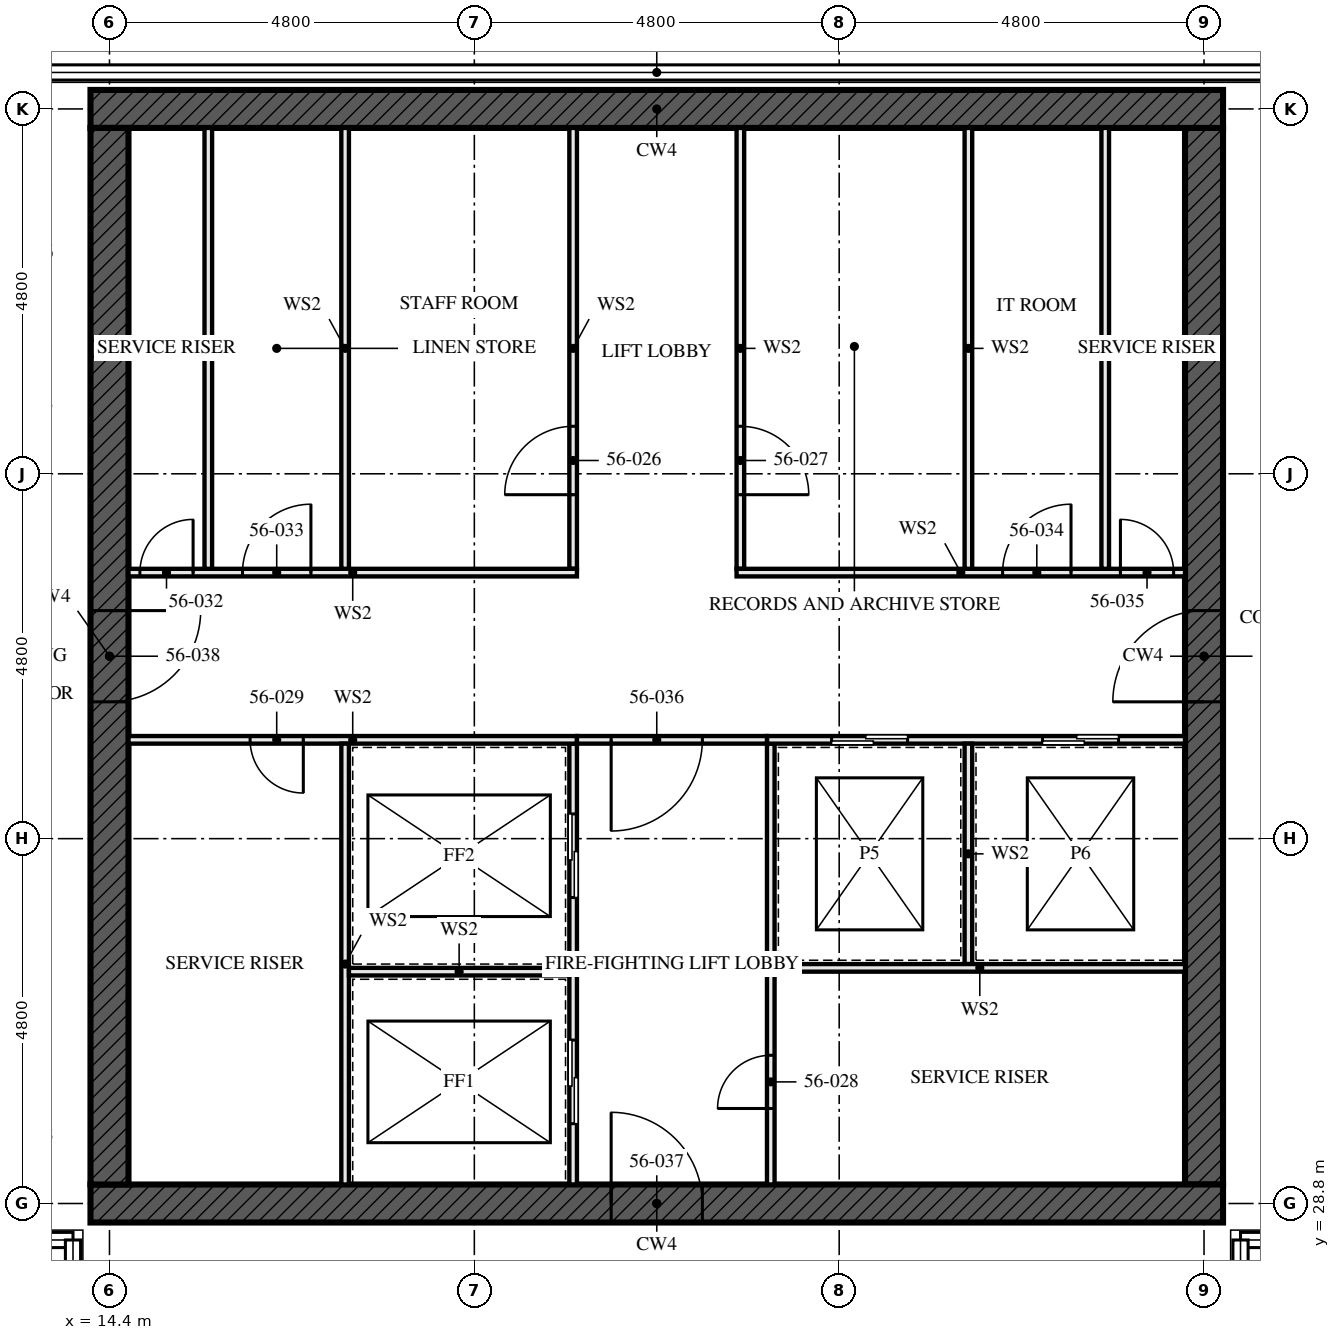
"""IFC4 building model, lengths in metres.
Left out: names, types, materials, properties, quantities, classifications, styles, units other than length and angle.
Written with IfcOpenShell. Run it as: python <this file> out.ifc"""

import sys

from ifc_helpers import new_model, si_unit, direction, frame, frame_2d, origin, place, context, subcontext, project, spatial, rectangle, extrude, element, fill, save


model = new_model("IFC4")
c1 = context("Model", 3, precision=1e-05, world=origin(), true_north=direction((0.0, 1.0)))
c2 = subcontext(c1, "Body", "Model", "MODEL_VIEW")
j1 = project(units=[si_unit("LENGTHUNIT", "METRE"), si_unit("PLANEANGLEUNIT", "RADIAN")], contexts=[c1])
p1 = place(None, origin())
s1 = spatial("IfcSite", under=j1, at=p1, CompositionType="ELEMENT")
p2 = place(p1, origin())
s2 = spatial("IfcBuilding", under=s1, at=p2, CompositionType="ELEMENT")
p3 = place(p2, frame((0.0, 0.0, 205.0)))
s3 = spatial("IfcBuildingStorey", under=s2, at=p3, CompositionType="ELEMENT", Elevation=205.0)
p4 = place(p3, frame((14.15, 28.8, -0.17), z_axis=(0.0, 0.0, 1.0), x_axis=(1.0, 0.0, 0.0)))
e1 = element("IfcWall", 1, at=p4, inside=s3, PredefinedType="SHEAR", context=c2, shape_type="SweptSolid", body=[
    extrude(rectangle(XDim=14.9, YDim=0.5, at=frame_2d((7.45, 0.0))), origin(), (0.0, 0.0, 1.0), 3.5),
])
p5 = place(p4, frame((6.85, 0.0, 0.17)))
e2 = element("IfcOpeningElement", 2, at=p5, cuts=e1, PredefinedType="OPENING", context=c2, shape_type="SweptSolid", body=[
    extrude(rectangle(XDim=1.2, YDim=2.1, at=frame_2d((0.6, 1.05))), frame((0.0, 0.26, 0.0), z_axis=(0.0, -1.0, 0.0), x_axis=(1.0, 0.0, 0.0)), (0.0, 0.0, 1.0), 0.521),
])
p6 = place(p3, frame((29.05, 43.2, -0.17), z_axis=(0.0, 0.0, 1.0), x_axis=(-1.0, 0.0, 0.0)))
e3 = element("IfcWall", 3, at=p6, inside=s3, PredefinedType="SHEAR", context=c2, shape_type="SweptSolid", body=[
    extrude(rectangle(XDim=14.9, YDim=0.5, at=frame_2d((7.45, 0.0))), origin(), (0.0, 0.0, 1.0), 3.5),
])
p7 = place(p3, frame((14.4, 42.95, -0.17), z_axis=(0.0, 0.0, 1.0), x_axis=(0.0, -1.0, 0.0)))
e4 = element("IfcWall", 4, at=p7, inside=s3, PredefinedType="SHEAR", context=c2, shape_type="SweptSolid", body=[
    extrude(rectangle(XDim=13.9, YDim=0.5, at=frame_2d((6.95, 0.0))), origin(), (0.0, 0.0, 1.0), 3.5),
])
p8 = place(p7, frame((6.35, 0.0, 0.17)))
e5 = element("IfcOpeningElement", 5, at=p8, cuts=e4, PredefinedType="OPENING", context=c2, shape_type="SweptSolid", body=[
    extrude(rectangle(XDim=1.2, YDim=2.1, at=frame_2d((0.6, 1.05))), frame((0.0, 0.26, 0.0), z_axis=(0.0, -1.0, 0.0), x_axis=(1.0, 0.0, 0.0)), (0.0, 0.0, 1.0), 0.521),
])
p9 = place(p3, frame((28.8, 29.05, -0.17), z_axis=(0.0, 0.0, 1.0), x_axis=(0.0, 1.0, 0.0)))
e6 = element("IfcWall", 6, at=p9, inside=s3, PredefinedType="SHEAR", context=c2, shape_type="SweptSolid", body=[
    extrude(rectangle(XDim=13.9, YDim=0.5, at=frame_2d((6.95, 0.0))), origin(), (0.0, 0.0, 1.0), 3.5),
])
p10 = place(p9, frame((6.35, 0.0, 0.17)))
e7 = element("IfcOpeningElement", 7, at=p10, cuts=e6, PredefinedType="OPENING", context=c2, shape_type="SweptSolid", body=[
    extrude(rectangle(XDim=1.2, YDim=2.1, at=frame_2d((0.6, 1.05))), frame((0.0, 0.26, 0.0), z_axis=(0.0, -1.0, 0.0), x_axis=(1.0, 0.0, 0.0)), (0.0, 0.0, 1.0), 0.521),
])
for number, where, z_axis, x_axis in (
    (8, (15.7, 37.15, 0.0), (0.0, 0.0, 1.0), (0.0, 1.0, 0.0)),
    (9, (27.5, 37.15, 0.0), (0.0, 0.0, 1.0), (0.0, 1.0, 0.0)),
):
    element("IfcWall", number, at=place(p3, frame(where, z_axis=z_axis, x_axis=x_axis)), inside=s3, PredefinedType="SOLIDWALL", context=c2, shape_type="SweptSolid", body=[
        extrude(rectangle(XDim=5.8, YDim=0.1, at=frame_2d((2.9, 0.0))), origin(), (0.0, 0.0, 1.0), 3.33),
    ])
p11 = place(p3, frame((20.5, 29.05, 0.0), z_axis=(0.0, 0.0, 1.0), x_axis=(0.0, 1.0, 0.0)))
e10 = element("IfcWall", 10, at=p11, inside=s3, PredefinedType="SOLIDWALL", context=c2, shape_type="SweptSolid", body=[
    extrude(rectangle(XDim=5.8, YDim=0.1, at=frame_2d((2.9, 0.0))), origin(), (0.0, 0.0, 1.0), 3.33),
])
p12 = place(p11, frame((0.8, 0.0, 0.0)))
e11 = element("IfcOpeningElement", 11, at=p12, cuts=e10, PredefinedType="OPENING", context=c2, shape_type="SweptSolid", body=[
    extrude(rectangle(XDim=1.1, YDim=2.3, at=frame_2d((0.55, 1.15))), frame((0.0, 0.061, 0.0), z_axis=(0.0, -1.0, 0.0), x_axis=(1.0, 0.0, 0.0)), (0.0, 0.0, 1.0), 0.121),
])
p13 = place(p11, frame((3.775, 0.0, 0.0)))
e12 = element("IfcOpeningElement", 12, at=p13, cuts=e10, PredefinedType="OPENING", context=c2, shape_type="SweptSolid", body=[
    extrude(rectangle(XDim=1.1, YDim=2.3, at=frame_2d((0.55, 1.15))), frame((0.0, 0.061, 0.0), z_axis=(0.0, -1.0, 0.0), x_axis=(1.0, 0.0, 0.0)), (0.0, 0.0, 1.0), 0.121),
])
p14 = place(p3, frame((20.5, 37.15, 0.0), z_axis=(0.0, 0.0, 1.0), x_axis=(0.0, 1.0, 0.0)))
e13 = element("IfcWall", 13, at=p14, inside=s3, PredefinedType="SOLIDWALL", context=c2, shape_type="SweptSolid", body=[
    extrude(rectangle(XDim=5.8, YDim=0.1, at=frame_2d((2.9, 0.0))), origin(), (0.0, 0.0, 1.0), 3.33),
])
p15 = place(p14, frame((0.975, 0.0, 0.0)))
e14 = element("IfcOpeningElement", 14, at=p15, cuts=e13, PredefinedType="OPENING", context=c2, shape_type="SweptSolid", body=[
    extrude(rectangle(XDim=0.9, YDim=2.1, at=frame_2d((0.45, 1.05))), frame((0.0, 0.061, 0.0), z_axis=(0.0, -1.0, 0.0), x_axis=(1.0, 0.0, 0.0)), (0.0, 0.0, 1.0), 0.121),
])
p16 = place(p3, frame((22.7, 37.15, 0.0), z_axis=(0.0, 0.0, 1.0), x_axis=(0.0, 1.0, 0.0)))
e15 = element("IfcWall", 15, at=p16, inside=s3, PredefinedType="SOLIDWALL", context=c2, shape_type="SweptSolid", body=[
    extrude(rectangle(XDim=5.8, YDim=0.1, at=frame_2d((2.9, 0.0))), origin(), (0.0, 0.0, 1.0), 3.33),
])
p17 = place(p16, frame((0.975, 0.0, 0.0)))
e16 = element("IfcOpeningElement", 16, at=p17, cuts=e15, PredefinedType="OPENING", context=c2, shape_type="SweptSolid", body=[
    extrude(rectangle(XDim=0.9, YDim=2.1, at=frame_2d((0.45, 1.05))), frame((0.0, 0.061, 0.0), z_axis=(0.0, -1.0, 0.0), x_axis=(1.0, 0.0, 0.0)), (0.0, 0.0, 1.0), 0.121),
])
p18 = place(p3, frame((23.1, 29.05, 0.0), z_axis=(0.0, 0.0, 1.0), x_axis=(0.0, 1.0, 0.0)))
e17 = element("IfcWall", 17, at=p18, inside=s3, PredefinedType="SOLIDWALL", context=c2, shape_type="SweptSolid", body=[
    extrude(rectangle(XDim=5.8, YDim=0.1, at=frame_2d((2.9, 0.0))), origin(), (0.0, 0.0, 1.0), 3.33),
])
p19 = place(p18, frame((1.0, 0.0, 0.0)))
e18 = element("IfcOpeningElement", 18, at=p19, cuts=e17, PredefinedType="OPENING", context=c2, shape_type="SweptSolid", body=[
    extrude(rectangle(XDim=0.7, YDim=2.1, at=frame_2d((0.35, 1.05))), frame((0.0, 0.061, 0.0), z_axis=(0.0, -1.0, 0.0), x_axis=(1.0, 0.0, 0.0)), (0.0, 0.0, 1.0), 0.121),
])
p20 = place(p3, frame((14.65, 34.9, 0.0), z_axis=(0.0, 0.0, 1.0), x_axis=(1.0, 0.0, 0.0)))
e19 = element("IfcWall", 19, at=p20, inside=s3, PredefinedType="SOLIDWALL", context=c2, shape_type="SweptSolid", body=[
    extrude(rectangle(XDim=5.9, YDim=0.1, at=frame_2d((2.95, 0.0))), origin(), (0.0, 0.0, 1.0), 3.33),
])
p21 = place(p20, frame((1.6, 0.0, 0.0)))
e20 = element("IfcOpeningElement", 20, at=p21, cuts=e19, PredefinedType="OPENING", context=c2, shape_type="SweptSolid", body=[
    extrude(rectangle(XDim=0.7, YDim=2.1, at=frame_2d((0.35, 1.05))), frame((0.0, 0.061, 0.0), z_axis=(0.0, -1.0, 0.0), x_axis=(1.0, 0.0, 0.0)), (0.0, 0.0, 1.0), 0.121),
])
p22 = place(p3, frame((23.05, 34.9, 0.0), z_axis=(0.0, 0.0, 1.0), x_axis=(1.0, 0.0, 0.0)))
e21 = element("IfcWall", 21, at=p22, inside=s3, PredefinedType="SOLIDWALL", context=c2, shape_type="SweptSolid", body=[
    extrude(rectangle(XDim=5.5, YDim=0.1, at=frame_2d((2.75, 0.0))), origin(), (0.0, 0.0, 1.0), 3.33),
])
p23 = place(p22, frame((0.85, 0.0, 0.0)))
e22 = element("IfcOpeningElement", 22, at=p23, cuts=e21, PredefinedType="OPENING", context=c2, shape_type="SweptSolid", body=[
    extrude(rectangle(XDim=1.0, YDim=2.1, at=frame_2d((0.5, 1.05))), frame((0.0, 0.061, 0.0), z_axis=(0.0, -1.0, 0.0), x_axis=(1.0, 0.0, 0.0)), (0.0, 0.0, 1.0), 0.121),
])
p24 = place(p22, frame((3.625, 0.0, 0.0)))
e23 = element("IfcOpeningElement", 23, at=p24, cuts=e21, PredefinedType="OPENING", context=c2, shape_type="SweptSolid", body=[
    extrude(rectangle(XDim=1.0, YDim=2.1, at=frame_2d((0.5, 1.05))), frame((0.0, 0.061, 0.0), z_axis=(0.0, -1.0, 0.0), x_axis=(1.0, 0.0, 0.0)), (0.0, 0.0, 1.0), 0.121),
])
p25 = place(p3, frame((14.65, 37.1, 0.0), z_axis=(0.0, 0.0, 1.0), x_axis=(1.0, 0.0, 0.0)))
e24 = element("IfcWall", 24, at=p25, inside=s3, PredefinedType="SOLIDWALL", context=c2, shape_type="SweptSolid", body=[
    extrude(rectangle(XDim=5.9, YDim=0.1, at=frame_2d((2.95, 0.0))), origin(), (0.0, 0.0, 1.0), 3.33),
])
p26 = place(p25, frame((0.15, 0.0, 0.0)))
e25 = element("IfcOpeningElement", 25, at=p26, cuts=e24, PredefinedType="OPENING", context=c2, shape_type="SweptSolid", body=[
    extrude(rectangle(XDim=0.7, YDim=2.1, at=frame_2d((0.35, 1.05))), frame((0.0, 0.061, 0.0), z_axis=(0.0, -1.0, 0.0), x_axis=(1.0, 0.0, 0.0)), (0.0, 0.0, 1.0), 0.121),
])
p27 = place(p25, frame((1.5, 0.0, 0.0)))
e26 = element("IfcOpeningElement", 26, at=p27, cuts=e24, PredefinedType="OPENING", context=c2, shape_type="SweptSolid", body=[
    extrude(rectangle(XDim=0.9, YDim=2.1, at=frame_2d((0.45, 1.05))), frame((0.0, 0.061, 0.0), z_axis=(0.0, -1.0, 0.0), x_axis=(1.0, 0.0, 0.0)), (0.0, 0.0, 1.0), 0.121),
])
p28 = place(p3, frame((22.65, 37.1, 0.0), z_axis=(0.0, 0.0, 1.0), x_axis=(1.0, 0.0, 0.0)))
e27 = element("IfcWall", 27, at=p28, inside=s3, PredefinedType="SOLIDWALL", context=c2, shape_type="SweptSolid", body=[
    extrude(rectangle(XDim=5.9, YDim=0.1, at=frame_2d((2.95, 0.0))), origin(), (0.0, 0.0, 1.0), 3.33),
])
p29 = place(p28, frame((3.5, 0.0, 0.0)))
e28 = element("IfcOpeningElement", 28, at=p29, cuts=e27, PredefinedType="OPENING", context=c2, shape_type="SweptSolid", body=[
    extrude(rectangle(XDim=0.9, YDim=2.1, at=frame_2d((0.45, 1.05))), frame((0.0, 0.061, 0.0), z_axis=(0.0, -1.0, 0.0), x_axis=(1.0, 0.0, 0.0)), (0.0, 0.0, 1.0), 0.121),
])
p30 = place(p28, frame((5.05, 0.0, 0.0)))
e29 = element("IfcOpeningElement", 29, at=p30, cuts=e27, PredefinedType="OPENING", context=c2, shape_type="SweptSolid", body=[
    extrude(rectangle(XDim=0.7, YDim=2.1, at=frame_2d((0.35, 1.05))), frame((0.0, 0.061, 0.0), z_axis=(0.0, -1.0, 0.0), x_axis=(1.0, 0.0, 0.0)), (0.0, 0.0, 1.0), 0.121),
])
p31 = place(p3, frame((20.55, 34.9, 0.0), z_axis=(0.0, 0.0, 1.0), x_axis=(1.0, 0.0, 0.0)))
e30 = element("IfcWall", 30, at=p31, inside=s3, PredefinedType="SOLIDWALL", context=c2, shape_type="SweptSolid", body=[
    extrude(rectangle(XDim=2.5, YDim=0.1, at=frame_2d((1.25, 0.0))), origin(), (0.0, 0.0, 1.0), 3.33),
])
p32 = place(p31, frame((0.45, 0.0, 0.0)))
e31 = element("IfcOpeningElement", 31, at=p32, cuts=e30, PredefinedType="OPENING", context=c2, shape_type="SweptSolid", body=[
    extrude(rectangle(XDim=1.2, YDim=2.1, at=frame_2d((0.6, 1.05))), frame((0.0, 0.061, 0.0), z_axis=(0.0, -1.0, 0.0), x_axis=(1.0, 0.0, 0.0)), (0.0, 0.0, 1.0), 0.121),
])
p33 = place(p3, frame((17.5, 29.05, 0.0), z_axis=(0.0, 0.0, 1.0), x_axis=(0.0, 1.0, 0.0)))
e32 = element("IfcWall", 32, at=p33, inside=s3, PredefinedType="SOLIDWALL", context=c2, shape_type="SweptSolid", body=[
    extrude(rectangle(XDim=5.8, YDim=0.1, at=frame_2d((2.9, 0.0))), origin(), (0.0, 0.0, 1.0), 3.33),
])
p34 = place(p3, frame((17.55, 31.85, 0.0), z_axis=(0.0, 0.0, 1.0), x_axis=(1.0, 0.0, 0.0)))
e33 = element("IfcWall", 33, at=p34, inside=s3, PredefinedType="SOLIDWALL", context=c2, shape_type="SweptSolid", body=[
    extrude(rectangle(XDim=2.9, YDim=0.1, at=frame_2d((1.45, 0.0))), origin(), (0.0, 0.0, 1.0), 3.33),
])
for number, where, z_axis, x_axis in (
    (34, (17.5, 37.15, 0.0), (0.0, 0.0, 1.0), (0.0, 1.0, 0.0)),
    (35, (25.7, 37.15, 0.0), (0.0, 0.0, 1.0), (0.0, 1.0, 0.0)),
):
    element("IfcWall", number, at=place(p3, frame(where, z_axis=z_axis, x_axis=x_axis)), inside=s3, PredefinedType="SOLIDWALL", context=c2, shape_type="SweptSolid", body=[
        extrude(rectangle(XDim=5.8, YDim=0.1, at=frame_2d((2.9, 0.0))), origin(), (0.0, 0.0, 1.0), 3.33),
    ])
p35 = place(p3, frame((25.7, 31.95, 0.0), z_axis=(0.0, 0.0, 1.0), x_axis=(0.0, 1.0, 0.0)))
e36 = element("IfcWall", 36, at=p35, inside=s3, PredefinedType="SOLIDWALL", context=c2, shape_type="SweptSolid", body=[
    extrude(rectangle(XDim=2.9, YDim=0.1, at=frame_2d((1.45, 0.0))), origin(), (0.0, 0.0, 1.0), 3.33),
])
p36 = place(p3, frame((23.15, 31.9, 0.0), z_axis=(0.0, 0.0, 1.0), x_axis=(1.0, 0.0, 0.0)))
e37 = element("IfcWall", 37, at=p36, inside=s3, PredefinedType="SOLIDWALL", context=c2, shape_type="SweptSolid", body=[
    extrude(rectangle(XDim=5.4, YDim=0.1, at=frame_2d((2.7, 0.0))), origin(), (0.0, 0.0, 1.0), 3.33),
])
p37 = place(p12, origin())
e38 = element("IfcDoor", 38, at=p37, inside=s3, OperationType="SLIDING_TO_LEFT", PredefinedType="DOOR", context=c2, shape_type="SweptSolid", body=[
    extrude(rectangle(XDim=1.1, YDim=2.3, at=frame_2d((0.55, 1.15))), frame((0.0, 0.05, 0.0), z_axis=(0.0, -1.0, 0.0), x_axis=(1.0, 0.0, 0.0)), (0.0, 0.0, 1.0), 0.1),
])
fill(e11, e38)
p38 = place(p13, origin())
e39 = element("IfcDoor", 39, at=p38, inside=s3, OperationType="SLIDING_TO_LEFT", PredefinedType="DOOR", context=c2, shape_type="SweptSolid", body=[
    extrude(rectangle(XDim=1.1, YDim=2.3, at=frame_2d((0.55, 1.15))), frame((0.0, 0.05, 0.0), z_axis=(0.0, -1.0, 0.0), x_axis=(1.0, 0.0, 0.0)), (0.0, 0.0, 1.0), 0.1),
])
fill(e12, e39)
p39 = place(p15, origin())
e40 = element("IfcDoor", 40, at=p39, inside=s3, OperationType="SINGLE_SWING_RIGHT", PredefinedType="DOOR", context=c2, shape_type="SweptSolid", body=[
    extrude(rectangle(XDim=0.9, YDim=2.1, at=frame_2d((0.45, 1.05))), frame((0.0, 0.027, 0.0), z_axis=(0.0, -1.0, 0.0), x_axis=(1.0, 0.0, 0.0)), (0.0, 0.0, 1.0), 0.054),
])
fill(e14, e40)
p40 = place(p17, frame((0.9, 0.0, 0.0), z_axis=(0.0, 0.0, 1.0), x_axis=(-1.0, 0.0, 0.0)))
e41 = element("IfcDoor", 41, at=p40, inside=s3, OperationType="SINGLE_SWING_LEFT", PredefinedType="DOOR", context=c2, shape_type="SweptSolid", body=[
    extrude(rectangle(XDim=0.9, YDim=2.1, at=frame_2d((0.45, 1.05))), frame((0.0, 0.027, 0.0), z_axis=(0.0, -1.0, 0.0), x_axis=(1.0, 0.0, 0.0)), (0.0, 0.0, 1.0), 0.054),
])
fill(e16, e41)
p41 = place(p19, origin())
e42 = element("IfcDoor", 42, at=p41, inside=s3, OperationType="SINGLE_SWING_RIGHT", PredefinedType="DOOR", context=c2, shape_type="SweptSolid", body=[
    extrude(rectangle(XDim=0.7, YDim=2.1, at=frame_2d((0.35, 1.05))), frame((0.0, 0.027, 0.0), z_axis=(0.0, -1.0, 0.0), x_axis=(1.0, 0.0, 0.0)), (0.0, 0.0, 1.0), 0.054),
])
fill(e18, e42)
p42 = place(p21, frame((0.7, 0.0, 0.0), z_axis=(0.0, 0.0, 1.0), x_axis=(-1.0, 0.0, 0.0)))
e43 = element("IfcDoor", 43, at=p42, inside=s3, OperationType="SINGLE_SWING_RIGHT", PredefinedType="DOOR", context=c2, shape_type="SweptSolid", body=[
    extrude(rectangle(XDim=0.7, YDim=2.1, at=frame_2d((0.35, 1.05))), frame((0.0, 0.027, 0.0), z_axis=(0.0, -1.0, 0.0), x_axis=(1.0, 0.0, 0.0)), (0.0, 0.0, 1.0), 0.054),
])
fill(e20, e43)
p43 = place(p23, origin())
e44 = element("IfcDoor", 44, at=p43, inside=s3, OperationType="SLIDING_TO_LEFT", PredefinedType="DOOR", context=c2, shape_type="SweptSolid", body=[
    extrude(rectangle(XDim=1.0, YDim=2.1, at=frame_2d((0.5, 1.05))), frame((0.0, 0.05, 0.0), z_axis=(0.0, -1.0, 0.0), x_axis=(1.0, 0.0, 0.0)), (0.0, 0.0, 1.0), 0.1),
])
fill(e22, e44)
p44 = place(p24, origin())
e45 = element("IfcDoor", 45, at=p44, inside=s3, OperationType="SLIDING_TO_LEFT", PredefinedType="DOOR", context=c2, shape_type="SweptSolid", body=[
    extrude(rectangle(XDim=1.0, YDim=2.1, at=frame_2d((0.5, 1.05))), frame((0.0, 0.05, 0.0), z_axis=(0.0, -1.0, 0.0), x_axis=(1.0, 0.0, 0.0)), (0.0, 0.0, 1.0), 0.1),
])
fill(e23, e45)
p45 = place(p26, origin())
e46 = element("IfcDoor", 46, at=p45, inside=s3, OperationType="SINGLE_SWING_LEFT", PredefinedType="DOOR", context=c2, shape_type="SweptSolid", body=[
    extrude(rectangle(XDim=0.7, YDim=2.1, at=frame_2d((0.35, 1.05))), frame((0.0, 0.027, 0.0), z_axis=(0.0, -1.0, 0.0), x_axis=(1.0, 0.0, 0.0)), (0.0, 0.0, 1.0), 0.054),
])
fill(e25, e46)
p46 = place(p27, origin())
e47 = element("IfcDoor", 47, at=p46, inside=s3, OperationType="SINGLE_SWING_LEFT", PredefinedType="DOOR", context=c2, shape_type="SweptSolid", body=[
    extrude(rectangle(XDim=0.9, YDim=2.1, at=frame_2d((0.45, 1.05))), frame((0.0, 0.027, 0.0), z_axis=(0.0, -1.0, 0.0), x_axis=(1.0, 0.0, 0.0)), (0.0, 0.0, 1.0), 0.054),
])
fill(e26, e47)
p47 = place(p29, origin())
e48 = element("IfcDoor", 48, at=p47, inside=s3, OperationType="SINGLE_SWING_LEFT", PredefinedType="DOOR", context=c2, shape_type="SweptSolid", body=[
    extrude(rectangle(XDim=0.9, YDim=2.1, at=frame_2d((0.45, 1.05))), frame((0.0, 0.027, 0.0), z_axis=(0.0, -1.0, 0.0), x_axis=(1.0, 0.0, 0.0)), (0.0, 0.0, 1.0), 0.054),
])
fill(e28, e48)
p48 = place(p30, origin())
e49 = element("IfcDoor", 49, at=p48, inside=s3, OperationType="SINGLE_SWING_RIGHT", PredefinedType="DOOR", context=c2, shape_type="SweptSolid", body=[
    extrude(rectangle(XDim=0.7, YDim=2.1, at=frame_2d((0.35, 1.05))), frame((0.0, 0.027, 0.0), z_axis=(0.0, -1.0, 0.0), x_axis=(1.0, 0.0, 0.0)), (0.0, 0.0, 1.0), 0.054),
])
fill(e29, e49)
p49 = place(p32, frame((1.2, 0.0, 0.0), z_axis=(0.0, 0.0, 1.0), x_axis=(-1.0, 0.0, 0.0)))
e50 = element("IfcDoor", 50, at=p49, inside=s3, OperationType="SINGLE_SWING_LEFT", PredefinedType="DOOR", context=c2, shape_type="SweptSolid", body=[
    extrude(rectangle(XDim=1.2, YDim=2.1, at=frame_2d((0.6, 1.05))), frame((0.0, 0.027, 0.0), z_axis=(0.0, -1.0, 0.0), x_axis=(1.0, 0.0, 0.0)), (0.0, 0.0, 1.0), 0.054),
])
fill(e31, e50)
p50 = place(p5, origin())
e51 = element("IfcDoor", 51, at=p50, inside=s3, OperationType="SINGLE_SWING_LEFT", PredefinedType="DOOR", context=c2, shape_type="SweptSolid", body=[
    extrude(rectangle(XDim=1.2, YDim=2.1, at=frame_2d((0.6, 1.05))), frame((0.0, 0.027, 0.0), z_axis=(0.0, -1.0, 0.0), x_axis=(1.0, 0.0, 0.0)), (0.0, 0.0, 1.0), 0.054),
])
fill(e2, e51)
p51 = place(p8, origin())
e52 = element("IfcDoor", 52, at=p51, inside=s3, OperationType="SINGLE_SWING_LEFT", PredefinedType="DOOR", context=c2, shape_type="SweptSolid", body=[
    extrude(rectangle(XDim=1.2, YDim=2.1, at=frame_2d((0.6, 1.05))), frame((0.0, 0.027, 0.0), z_axis=(0.0, -1.0, 0.0), x_axis=(1.0, 0.0, 0.0)), (0.0, 0.0, 1.0), 0.054),
])
fill(e5, e52)
p52 = place(p10, origin())
e53 = element("IfcDoor", 53, at=p52, inside=s3, OperationType="SINGLE_SWING_LEFT", PredefinedType="DOOR", context=c2, shape_type="SweptSolid", body=[
    extrude(rectangle(XDim=1.2, YDim=2.1, at=frame_2d((0.6, 1.05))), frame((0.0, 0.027, 0.0), z_axis=(0.0, -1.0, 0.0), x_axis=(1.0, 0.0, 0.0)), (0.0, 0.0, 1.0), 0.054),
])
fill(e7, e53)
save(model, sys.argv[1])
